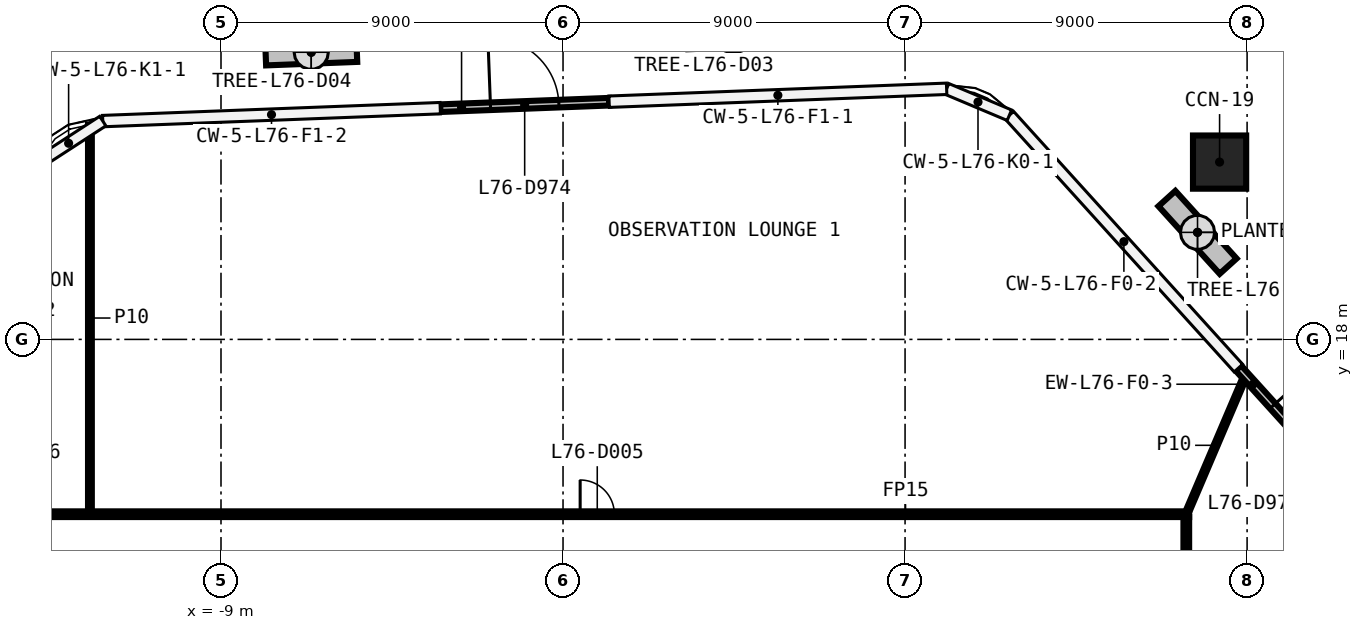
"""IFC4 building model, lengths in metres.
Left out: names, types, materials, properties, quantities, classifications, styles, units other than length and angle.
Written with IfcOpenShell. Run it as: python <this file> out.ifc"""

import sys

from ifc_helpers import new_model, si_unit, direction, frame, frame_2d, origin, origin_2d, place, context, subcontext, project, spatial, rectangle, hollow_rectangle, extrude, element, fill, save


model = new_model("IFC4")
c1 = context("Model", 3, precision=1e-05, world=origin(), true_north=direction((0.0, 1.0)))
c2 = subcontext(c1, "Body", "Model", "MODEL_VIEW")
j1 = project(units=[si_unit("LENGTHUNIT", "METRE"), si_unit("PLANEANGLEUNIT", "RADIAN")], contexts=[c1])
p1 = place(None, origin())
s1 = spatial("IfcSite", under=j1, at=p1, CompositionType="ELEMENT")
p2 = place(p1, origin())
s2 = spatial("IfcBuilding", under=s1, at=p2, CompositionType="ELEMENT")
p3 = place(p2, frame((0.0, 0.0, 353.0)))
s3 = spatial("IfcBuildingStorey", under=s2, at=p3, CompositionType="ELEMENT", Elevation=353.0)
p4 = place(p3, frame((17.276, 22.666, 0.0), z_axis=(0.0, 0.0, 1.0), x_axis=(1.0, 0.0, 0.0)))
e1 = element("IfcColumn", 1, at=p4, inside=s3, PredefinedType="COLUMN", context=c2, shape_type="SweptSolid", body=[
    extrude(hollow_rectangle(XDim=1.4, YDim=1.4, WallThickness=0.06, at=origin_2d()), origin(), (0.0, 0.0, 1.0), 6.0),
])
p5 = place(p3, frame((-16.475, 13.4, 0.0), z_axis=(0.0, 0.0, 1.0), x_axis=(1.0, 0.0, 0.0)))
e2 = element("IfcWall", 2, at=p5, inside=s3, PredefinedType="PARTITIONING", context=c2, shape_type="SweptSolid", body=[
    extrude(rectangle(XDim=32.95, YDim=0.15, at=frame_2d((16.475, 0.0))), origin(), (0.0, 0.0, 1.0), 5.6),
])
p6 = place(p5, frame((16.926, 0.0, 0.0)))
e3 = element("IfcOpeningElement", 3, at=p6, cuts=e2, PredefinedType="OPENING", context=c2, shape_type="SweptSolid", body=[
    extrude(rectangle(XDim=0.9, YDim=2.1, at=frame_2d((0.45, 1.05))), frame((0.0, 0.085, 0.0), z_axis=(0.0, -1.0, 0.0), x_axis=(1.0, 0.0, 0.0)), (0.0, 0.0, 1.0), 0.17),
])
p7 = place(p5, frame((1.6, 0.0, 0.0)))
e4 = element("IfcOpeningElement", 4, at=p7, cuts=e2, PredefinedType="OPENING", context=c2, shape_type="SweptSolid", body=[
    extrude(rectangle(XDim=0.9, YDim=2.1, at=frame_2d((0.45, 1.05))), frame((0.0, 0.085, 0.0), z_axis=(0.0, -1.0, 0.0), x_axis=(1.0, 0.0, 0.0)), (0.0, 0.0, 1.0), 0.17),
])
p8 = place(p3, frame((16.4, 13.4, 0.0), z_axis=(0.0, 0.0, 1.0), x_axis=(0.392341578788, 0.919819594026, 0.0)))
e5 = element("IfcWall", 5, at=p8, inside=s3, PredefinedType="PARTITIONING", context=c2, shape_type="SweptSolid", body=[
    extrude(rectangle(XDim=3.942, YDim=0.1, at=frame_2d((1.971, 0.0))), origin(), (0.0, 0.0, 1.0), 5.6),
])
p9 = place(p3, frame((16.4, 13.325, 0.0), z_axis=(0.0, 0.0, 1.0), x_axis=(0.0, -1.0, 0.0)))
e6 = element("IfcWall", 6, at=p9, inside=s3, PredefinedType="PARTITIONING", context=c2, shape_type="SweptSolid", body=[
    extrude(rectangle(XDim=26.65, YDim=0.15, at=frame_2d((13.325, 0.0))), origin(), (0.0, 0.0, 1.0), 5.6),
])
p10 = place(p9, frame((6.55, 0.0, 0.0)))
e7 = element("IfcOpeningElement", 7, at=p10, cuts=e6, PredefinedType="OPENING", context=c2, shape_type="SweptSolid", body=[
    extrude(rectangle(XDim=0.9, YDim=2.1, at=frame_2d((0.45, 1.05))), frame((0.0, 0.085, 0.0), z_axis=(0.0, -1.0, 0.0), x_axis=(1.0, 0.0, 0.0)), (0.0, 0.0, 1.0), 0.17),
])
p11 = place(p3, frame((-12.449, 13.475, 0.0), z_axis=(0.0, 0.0, 1.0), x_axis=(0.0, 1.0, 0.0)))
e8 = element("IfcWall", 8, at=p11, inside=s3, PredefinedType="PARTITIONING", context=c2, shape_type="SweptSolid", body=[
    extrude(rectangle(XDim=10.175, YDim=0.1, at=frame_2d((5.087, 0.0))), origin(), (0.0, 0.0, 1.0), 5.6),
])
p12 = place(p3, frame((17.771, 17.245, 0.0), z_axis=(0.0, 0.0, 1.0), x_axis=(0.67127041935, -0.741212536392, 0.0)))
e9 = element("IfcWall", 9, at=p12, inside=s3, PredefinedType="SOLIDWALL", context=c2, shape_type="SweptSolid", body=[
    extrude(rectangle(XDim=4.492, YDim=0.2, at=frame_2d((2.246, 0.0))), origin(), (0.0, 0.0, 1.0), 5.6),
])
p13 = place(p12, frame((1.346, 0.0, 0.0)))
e10 = element("IfcOpeningElement", 10, at=p13, cuts=e9, PredefinedType="OPENING", context=c2, shape_type="SweptSolid", body=[
    extrude(rectangle(XDim=1.8, YDim=2.4, at=frame_2d((0.9, 1.2))), frame((0.0, 0.11, 0.0), z_axis=(0.0, -1.0, 0.0), x_axis=(1.0, 0.0, 0.0)), (0.0, 0.0, 1.0), 0.22),
])
p14 = place(p3, frame((-3.231, 24.085, 0.0), z_axis=(0.0, 0.0, 1.0), x_axis=(0.999267728071, 0.038262352715, 0.0)))
e11 = element("IfcWall", 11, at=p14, inside=s3, PredefinedType="SOLIDWALL", context=c2, shape_type="SweptSolid", body=[
    extrude(rectangle(XDim=4.447, YDim=0.2, at=frame_2d((2.224, 0.0))), origin(), (0.0, 0.0, 1.0), 5.6),
])
p15 = place(p14, frame((1.324, 0.0, 0.0)))
e12 = element("IfcOpeningElement", 12, at=p15, cuts=e11, PredefinedType="OPENING", context=c2, shape_type="SweptSolid", body=[
    extrude(rectangle(XDim=1.8, YDim=2.4, at=frame_2d((0.9, 1.2))), frame((0.0, 0.11, 0.0), z_axis=(0.0, -1.0, 0.0), x_axis=(1.0, 0.0, 0.0)), (0.0, 0.0, 1.0), 0.22),
])
for number, where, z_axis, x_axis in (
    (13, (17.501, 19.927, 0.0), (0.0, 0.0, 1.0), (-0.671, 0.741, 0.0)),
    (14, (-5.427, 25.602, 0.0), (0.0, 0.0, 1.0), (-0.999, -0.038, 0.0)),
):
    element("IfcWall", number, at=place(p3, frame(where, z_axis=z_axis, x_axis=x_axis)), inside=s3, PredefinedType="SOLIDWALL", context=c2, shape_type="SweptSolid", body=[
        extrude(rectangle(XDim=2.4, YDim=0.6, at=frame_2d((1.2, 0.0))), origin(), (0.0, 0.0, 1.0), 0.42),
    ])
p16 = place(p6, origin())
e15 = element("IfcDoor", 15, at=p16, inside=s3, OperationType="SINGLE_SWING_RIGHT", PredefinedType="DOOR", context=c2, shape_type="SweptSolid", body=[
    extrude(rectangle(XDim=0.9, YDim=2.1, at=frame_2d((0.45, 1.05))), frame((0.0, 0.025, 0.0), z_axis=(0.0, -1.0, 0.0), x_axis=(1.0, 0.0, 0.0)), (0.0, 0.0, 1.0), 0.05),
])
fill(e3, e15)
p17 = place(p13, origin())
e16 = element("IfcDoor", 16, at=p17, inside=s3, OperationType="SINGLE_SWING_LEFT", PredefinedType="DOOR", context=c2, shape_type="SweptSolid", body=[
    extrude(rectangle(XDim=1.8, YDim=2.4, at=frame_2d((0.9, 1.2))), frame((0.0, 0.025, 0.0), z_axis=(0.0, -1.0, 0.0), x_axis=(1.0, 0.0, 0.0)), (0.0, 0.0, 1.0), 0.05),
])
fill(e10, e16)
p18 = place(p15, origin())
e17 = element("IfcDoor", 17, at=p18, inside=s3, OperationType="SINGLE_SWING_LEFT", PredefinedType="DOOR", context=c2, shape_type="SweptSolid", body=[
    extrude(rectangle(XDim=1.8, YDim=2.4, at=frame_2d((0.9, 1.2))), frame((0.0, 0.025, 0.0), z_axis=(0.0, -1.0, 0.0), x_axis=(1.0, 0.0, 0.0)), (0.0, 0.0, 1.0), 0.05),
])
fill(e12, e17)
save(model, sys.argv[1])
